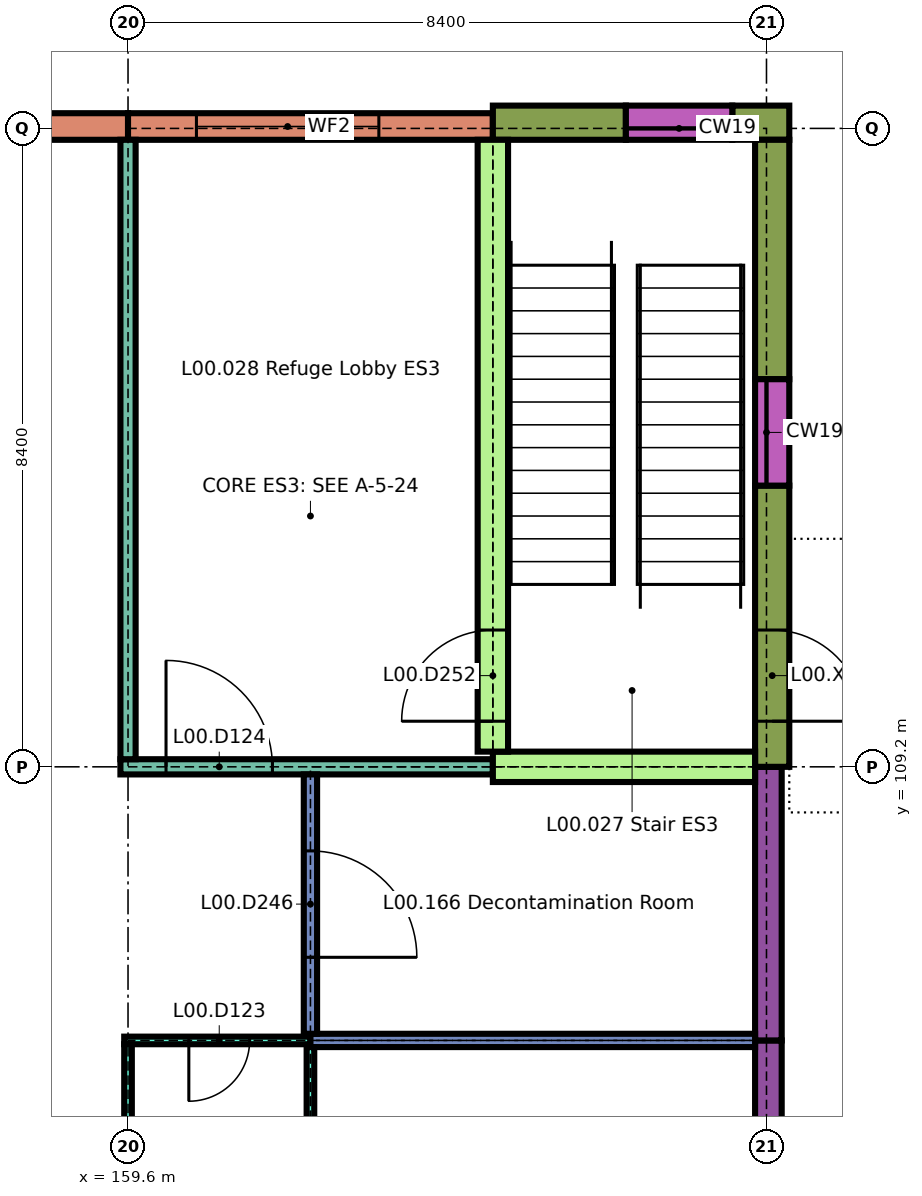
"""IFC4 building model, lengths in metres.
Left out: names, types, materials, properties, quantities, classifications, styles, units other than length and angle.
Written with IfcOpenShell. Run it as: python <this file> out.ifc"""

import sys

from ifc_helpers import new_model, si_unit, direction, frame, frame_2d, origin, place, context, subcontext, project, spatial, rectangle, extrude, element, fill, save


model = new_model("IFC4")
c1 = context("Model", 3, precision=1e-05, world=origin(), true_north=direction((0.0, 1.0)))
c2 = subcontext(c1, "Body", "Model", "MODEL_VIEW")
j1 = project(units=[si_unit("LENGTHUNIT", "METRE"), si_unit("PLANEANGLEUNIT", "RADIAN")], contexts=[c1])
p1 = place(None, origin())
s1 = spatial("IfcSite", under=j1, at=p1, CompositionType="ELEMENT")
p2 = place(p1, origin())
s2 = spatial("IfcBuilding", under=s1, at=p2, CompositionType="ELEMENT")
p3 = place(p2, origin())
s3 = spatial("IfcBuildingStorey", under=s2, at=p3, CompositionType="ELEMENT", Elevation=0.0)
p4 = place(p3, frame((156.6, 117.625, 0.0), z_axis=(0.0, 0.0, 1.0), x_axis=(1.0, 0.0, 0.0)))
e1 = element("IfcWall", 1, at=p4, inside=s3, PredefinedType="SOLIDWALL", context=c2, shape_type="SweptSolid", body=[
    extrude(rectangle(XDim=3.0, YDim=0.35, at=frame_2d((1.5, 0.0))), origin(), (0.0, 0.0, 1.0), 4.14),
])
p5 = place(p4, frame((0.45, 0.0, 0.9)))
e2 = element("IfcOpeningElement", 2, at=p5, cuts=e1, PredefinedType="OPENING", context=c2, shape_type="SweptSolid", body=[
    extrude(rectangle(XDim=0.9, YDim=2.1, at=frame_2d((0.45, 1.05))), frame((0.0, 0.185, 0.0), z_axis=(0.0, -1.0, 0.0), x_axis=(1.0, 0.0, 0.0)), (0.0, 0.0, 1.0), 0.37),
])
p6 = place(p3, frame((159.6, 117.625, 0.0), z_axis=(0.0, 0.0, 1.0), x_axis=(1.0, 0.0, 0.0)))
e3 = element("IfcWall", 3, at=p6, inside=s3, PredefinedType="SOLIDWALL", context=c2, shape_type="SweptSolid", body=[
    extrude(rectangle(XDim=4.8, YDim=0.35, at=frame_2d((2.4, 0.0))), origin(), (0.0, 0.0, 1.0), 4.14),
])
p7 = place(p6, frame((0.9, 0.0, 0.9)))
e4 = element("IfcOpeningElement", 4, at=p7, cuts=e3, PredefinedType="OPENING", context=c2, shape_type="SweptSolid", body=[
    extrude(rectangle(XDim=2.4, YDim=2.1, at=frame_2d((1.2, 1.05))), frame((0.0, 0.185, 0.0), z_axis=(0.0, -1.0, 0.0), x_axis=(1.0, 0.0, 0.0)), (0.0, 0.0, 1.0), 0.37),
])
p8 = place(p3, frame((164.4, 117.675, 0.0), z_axis=(0.0, 0.0, 1.0), x_axis=(1.0, 0.0, 0.0)))
e5 = element("IfcWall", 5, at=p8, inside=s3, PredefinedType="SOLIDWALL", context=c2, shape_type="SweptSolid", body=[
    extrude(rectangle(XDim=1.75, YDim=0.45, at=frame_2d((0.875, 0.0))), origin(), (0.0, 0.0, 1.0), 4.14),
])
p9 = place(p3, frame((167.55, 117.675, 0.0), z_axis=(0.0, 0.0, 1.0), x_axis=(1.0, 0.0, 0.0)))
e6 = element("IfcWall", 6, at=p9, inside=s3, PredefinedType="SOLIDWALL", context=c2, shape_type="SweptSolid", body=[
    extrude(rectangle(XDim=0.75, YDim=0.45, at=frame_2d((0.375, 0.0))), origin(), (0.0, 0.0, 1.0), 4.14),
])
p10 = place(p3, frame((166.15, 117.675, 0.0), z_axis=(0.0, 0.0, 1.0), x_axis=(1.0, 0.0, 0.0)))
e7 = element("IfcWall", 7, at=p10, inside=s3, PredefinedType="SOLIDWALL", context=c2, shape_type="SweptSolid", body=[
    extrude(rectangle(XDim=1.4, YDim=0.45, at=frame_2d((0.7, 0.0))), origin(), (0.0, 0.0, 1.0), 0.6),
])
p11 = place(p3, frame((168.025, 101.225, 0.0), z_axis=(0.0, 0.0, 1.0), x_axis=(0.0, 1.0, 0.0)))
e8 = element("IfcWall", 8, at=p11, inside=s3, PredefinedType="SOLIDWALL", context=c2, shape_type="SweptSolid", body=[
    extrude(rectangle(XDim=4.375, YDim=0.35, at=frame_2d((2.188, 0.0))), origin(), (0.0, 0.0, 1.0), 3.84),
])
p12 = place(p11, frame((0.775, 0.0, 0.9)))
e9 = element("IfcOpeningElement", 9, at=p12, cuts=e8, PredefinedType="OPENING", context=c2, shape_type="SweptSolid", body=[
    extrude(rectangle(XDim=1.8, YDim=2.1, at=frame_2d((0.9, 1.05))), frame((0.0, 0.185, 0.0), z_axis=(0.0, -1.0, 0.0), x_axis=(1.0, 0.0, 0.0)), (0.0, 0.0, 1.0), 0.37),
])
p13 = place(p3, frame((168.025, 105.6, 0.0), z_axis=(0.0, 0.0, 1.0), x_axis=(0.0, 1.0, 0.0)))
e10 = element("IfcWall", 10, at=p13, inside=s3, PredefinedType="SOLIDWALL", context=c2, shape_type="SweptSolid", body=[
    extrude(rectangle(XDim=3.6, YDim=0.35, at=frame_2d((1.8, 0.0))), origin(), (0.0, 0.0, 1.0), 3.84),
])
p14 = place(p3, frame((168.075, 109.2, 0.0), z_axis=(0.0, 0.0, 1.0), x_axis=(0.0, 1.0, 0.0)))
e11 = element("IfcWall", 11, at=p14, inside=s3, PredefinedType="SOLIDWALL", context=c2, shape_type="SweptSolid", body=[
    extrude(rectangle(XDim=3.7, YDim=0.45, at=frame_2d((1.85, 0.0))), origin(), (0.0, 0.0, 1.0), 4.14),
])
p15 = place(p14, frame((0.6, 0.0, 0.0)))
e12 = element("IfcOpeningElement", 12, at=p15, cuts=e11, PredefinedType="OPENING", context=c2, shape_type="SweptSolid", body=[
    extrude(rectangle(XDim=1.2, YDim=2.1, at=frame_2d((0.6, 1.05))), frame((0.0, 0.235, 0.0), z_axis=(0.0, -1.0, 0.0), x_axis=(1.0, 0.0, 0.0)), (0.0, 0.0, 1.0), 0.47),
])
p16 = place(p3, frame((168.075, 114.3, 0.0), z_axis=(0.0, 0.0, 1.0), x_axis=(0.0, 1.0, 0.0)))
e13 = element("IfcWall", 13, at=p16, inside=s3, PredefinedType="SOLIDWALL", context=c2, shape_type="SweptSolid", body=[
    extrude(rectangle(XDim=3.15, YDim=0.45, at=frame_2d((1.575, 0.0))), origin(), (0.0, 0.0, 1.0), 4.14),
])
p17 = place(p3, frame((168.075, 112.9, 0.0), z_axis=(0.0, 0.0, 1.0), x_axis=(0.0, 1.0, 0.0)))
e14 = element("IfcWall", 14, at=p17, inside=s3, PredefinedType="SOLIDWALL", context=c2, shape_type="SweptSolid", body=[
    extrude(rectangle(XDim=1.4, YDim=0.45, at=frame_2d((0.7, 0.0))), origin(), (0.0, 0.0, 1.0), 0.6),
])
p18 = place(p3, frame((159.55, 105.6, 0.0), z_axis=(0.0, 0.0, 1.0), x_axis=(1.0, 0.0, 0.0)))
e15 = element("IfcWall", 15, at=p18, inside=s3, PredefinedType="PARTITIONING", context=c2, shape_type="SweptSolid", body=[
    extrude(rectangle(XDim=2.45, YDim=0.1, at=frame_2d((1.225, 0.0))), origin(), (0.0, 0.0, 1.0), 4.14),
])
p19 = place(p18, frame((0.85, 0.0, 0.0)))
e16 = element("IfcOpeningElement", 16, at=p19, cuts=e15, PredefinedType="OPENING", context=c2, shape_type="SweptSolid", body=[
    extrude(rectangle(XDim=0.8, YDim=2.1, at=frame_2d((0.4, 1.05))), frame((0.0, 0.06, 0.0), z_axis=(0.0, -1.0, 0.0), x_axis=(1.0, 0.0, 0.0)), (0.0, 0.0, 1.0), 0.12),
])
p20 = place(p3, frame((162.0, 105.6, 0.0), z_axis=(0.0, 0.0, 1.0), x_axis=(1.0, 0.0, 0.0)))
e17 = element("IfcWall", 17, at=p20, inside=s3, PredefinedType="PARTITIONING", context=c2, shape_type="SweptSolid", body=[
    extrude(rectangle(XDim=5.85, YDim=0.175, at=frame_2d((2.925, 0.0))), origin(), (0.0, 0.0, 1.0), 4.14),
])
p21 = place(p3, frame((159.5, 109.2, 0.0), z_axis=(0.0, 0.0, 1.0), x_axis=(1.0, 0.0, 0.0)))
e18 = element("IfcWall", 18, at=p21, inside=s3, PredefinedType="PARTITIONING", context=c2, shape_type="SweptSolid", body=[
    extrude(rectangle(XDim=4.9, YDim=0.2, at=frame_2d((2.45, 0.0))), origin(), (0.0, 0.0, 1.0), 4.14),
])
p22 = place(p21, frame((0.6, 0.0, 0.0)))
e19 = element("IfcOpeningElement", 19, at=p22, cuts=e18, PredefinedType="OPENING", context=c2, shape_type="SweptSolid", body=[
    extrude(rectangle(XDim=1.4, YDim=2.1, at=frame_2d((0.7, 1.05))), frame((0.0, 0.11, 0.0), z_axis=(0.0, -1.0, 0.0), x_axis=(1.0, 0.0, 0.0)), (0.0, 0.0, 1.0), 0.22),
])
p23 = place(p3, frame((164.4, 109.2, 0.0), z_axis=(0.0, 0.0, 1.0), x_axis=(1.0, 0.0, 0.0)))
e20 = element("IfcWall", 20, at=p23, inside=s3, PredefinedType="SHEAR", context=c2, shape_type="SweptSolid", body=[
    extrude(rectangle(XDim=3.45, YDim=0.4, at=frame_2d((1.725, 0.0))), origin(), (0.0, 0.0, 1.0), 4.14),
])
p24 = place(p3, frame((159.6, 101.225, 0.0), z_axis=(0.0, 0.0, 1.0), x_axis=(0.0, 1.0, 0.0)))
e21 = element("IfcWall", 21, at=p24, inside=s3, PredefinedType="PARTITIONING", context=c2, shape_type="SweptSolid", body=[
    extrude(rectangle(XDim=4.325, YDim=0.1, at=frame_2d((2.163, 0.0))), origin(), (0.0, 0.0, 1.0), 4.14),
])
p25 = place(p3, frame((159.6, 109.3, 0.0), z_axis=(0.0, 0.0, 1.0), x_axis=(0.0, 1.0, 0.0)))
e22 = element("IfcWall", 22, at=p25, inside=s3, PredefinedType="PARTITIONING", context=c2, shape_type="SweptSolid", body=[
    extrude(rectangle(XDim=8.15, YDim=0.2, at=frame_2d((4.075, 0.0))), origin(), (0.0, 0.0, 1.0), 4.14),
])
p26 = place(p3, frame((162.0, 100.8, 0.0), z_axis=(0.0, 0.0, 1.0), x_axis=(0.0, 1.0, 0.0)))
e23 = element("IfcWall", 23, at=p26, inside=s3, PredefinedType="PARTITIONING", context=c2, shape_type="SweptSolid", body=[
    extrude(rectangle(XDim=4.712, YDim=0.1, at=frame_2d((2.356, 0.0))), origin(), (0.0, 0.0, 1.0), 4.14),
])
p27 = place(p3, frame((162.0, 105.688, 0.0), z_axis=(0.0, 0.0, 1.0), x_axis=(0.0, 1.0, 0.0)))
e24 = element("IfcWall", 24, at=p27, inside=s3, PredefinedType="PARTITIONING", context=c2, shape_type="SweptSolid", body=[
    extrude(rectangle(XDim=3.413, YDim=0.175, at=frame_2d((1.706, 0.0))), origin(), (0.0, 0.0, 1.0), 4.14),
])
p28 = place(p27, frame((1.006, 0.0, 0.0)))
e25 = element("IfcOpeningElement", 25, at=p28, cuts=e24, PredefinedType="OPENING", context=c2, shape_type="SweptSolid", body=[
    extrude(rectangle(XDim=1.4, YDim=2.1, at=frame_2d((0.7, 1.05))), frame((0.0, 0.097, 0.0), z_axis=(0.0, -1.0, 0.0), x_axis=(1.0, 0.0, 0.0)), (0.0, 0.0, 1.0), 0.195),
])
p29 = place(p3, frame((164.4, 109.4, 0.0), z_axis=(0.0, 0.0, 1.0), x_axis=(0.0, 1.0, 0.0)))
e26 = element("IfcWall", 26, at=p29, inside=s3, PredefinedType="SHEAR", context=c2, shape_type="SweptSolid", body=[
    extrude(rectangle(XDim=8.05, YDim=0.4, at=frame_2d((4.025, 0.0))), origin(), (0.0, 0.0, 1.0), 4.14),
])
p30 = place(p29, frame((0.4, 0.0, 0.0)))
e27 = element("IfcOpeningElement", 27, at=p30, cuts=e26, PredefinedType="OPENING", context=c2, shape_type="SweptSolid", body=[
    extrude(rectangle(XDim=1.2, YDim=2.1, at=frame_2d((0.6, 1.05))), frame((0.0, 0.21, 0.0), z_axis=(0.0, -1.0, 0.0), x_axis=(1.0, 0.0, 0.0)), (0.0, 0.0, 1.0), 0.42),
])
p31 = place(p7, origin())
e28 = element("IfcWindow", 28, at=p31, inside=s3, PartitioningType="DOUBLE_PANEL_VERTICAL", PredefinedType="WINDOW", context=c2, shape_type="SweptSolid", body=[
    extrude(rectangle(XDim=2.4, YDim=2.1, at=frame_2d((1.2, 1.05))), frame((0.0, 0.03, 0.0), z_axis=(0.0, -1.0, 0.0), x_axis=(1.0, 0.0, 0.0)), (0.0, 0.0, 1.0), 0.06),
])
fill(e4, e28)
p32 = place(p15, frame((1.2, 0.0, 0.0), x_axis=(-1.0, 0.0, 0.0)))
e29 = element("IfcDoor", 29, at=p32, inside=s3, OperationType="SINGLE_SWING_LEFT", PredefinedType="DOOR", context=c2, shape_type="SweptSolid", body=[
    extrude(rectangle(XDim=1.2, YDim=2.1, at=frame_2d((0.6, 1.05))), frame((0.0, 0.025, 0.0), z_axis=(0.0, -1.0, 0.0), x_axis=(1.0, 0.0, 0.0)), (0.0, 0.0, 1.0), 0.05),
])
fill(e12, e29)
p33 = place(p19, origin())
e30 = element("IfcDoor", 30, at=p33, inside=s3, OperationType="SINGLE_SWING_LEFT", PredefinedType="DOOR", context=c2, shape_type="SweptSolid", body=[
    extrude(rectangle(XDim=0.8, YDim=2.1, at=frame_2d((0.4, 1.05))), frame((0.0, 0.02, 0.0), z_axis=(0.0, -1.0, 0.0), x_axis=(1.0, 0.0, 0.0)), (0.0, 0.0, 1.0), 0.04),
])
fill(e16, e30)
p34 = place(p22, origin())
e31 = element("IfcDoor", 31, at=p34, inside=s3, OperationType="SINGLE_SWING_RIGHT", PredefinedType="DOOR", context=c2, shape_type="SweptSolid", body=[
    extrude(rectangle(XDim=1.4, YDim=2.1, at=frame_2d((0.7, 1.05))), frame((0.0, 0.03, 0.0), z_axis=(0.0, -1.0, 0.0), x_axis=(1.0, 0.0, 0.0)), (0.0, 0.0, 1.0), 0.06),
])
fill(e19, e31)
p35 = place(p28, origin())
e32 = element("IfcDoor", 32, at=p35, inside=s3, OperationType="SINGLE_SWING_LEFT", PredefinedType="DOOR", context=c2, shape_type="SweptSolid", body=[
    extrude(rectangle(XDim=1.4, YDim=2.1, at=frame_2d((0.7, 1.05))), frame((0.0, 0.025, 0.0), z_axis=(0.0, -1.0, 0.0), x_axis=(1.0, 0.0, 0.0)), (0.0, 0.0, 1.0), 0.05),
])
fill(e25, e32)
p36 = place(p30, origin())
e33 = element("IfcDoor", 33, at=p36, inside=s3, OperationType="SINGLE_SWING_RIGHT", PredefinedType="DOOR", context=c2, shape_type="SweptSolid", body=[
    extrude(rectangle(XDim=1.2, YDim=2.1, at=frame_2d((0.6, 1.05))), frame((0.0, 0.025, 0.0), z_axis=(0.0, -1.0, 0.0), x_axis=(1.0, 0.0, 0.0)), (0.0, 0.0, 1.0), 0.05),
])
fill(e27, e33)
save(model, sys.argv[1])
